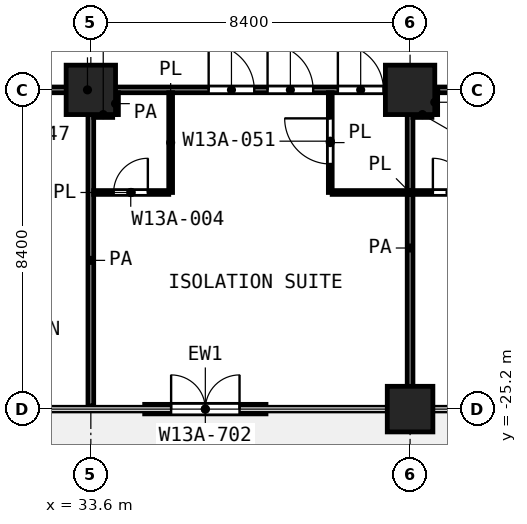
"""IFC4 building model, lengths in metres.
Left out: names, types, materials, properties, quantities, classifications, styles, units other than length and angle.
Written with IfcOpenShell. Run it as: python <this file> out.ifc"""

import sys

from ifc_helpers import new_model, si_unit, direction, frame, frame_2d, origin, origin_2d, place, context, subcontext, project, spatial, rectangle, extrude, element, fill, save


model = new_model("IFC4")
c1 = context("Model", 3, precision=1e-05, world=origin(), true_north=direction((0.0, 1.0)))
c2 = subcontext(c1, "Body", "Model", "MODEL_VIEW")
j1 = project(units=[si_unit("LENGTHUNIT", "METRE"), si_unit("PLANEANGLEUNIT", "RADIAN")], contexts=[c1])
p1 = place(None, origin())
s1 = spatial("IfcSite", under=j1, at=p1, CompositionType="ELEMENT")
p2 = place(p1, origin())
s2 = spatial("IfcBuilding", under=s1, at=p2, CompositionType="ELEMENT")
p3 = place(p2, frame((0.0, 0.0, 60.2)))
s3 = spatial("IfcBuildingStorey", under=s2, at=p3, CompositionType="ELEMENT", Elevation=60.2)
for number, where, z_axis, x_axis in (
    (1, (33.6, -16.8, 0.0), (0.0, 0.0, 1.0), (1.0, 0.0, 0.0)),
    (2, (42.0, -16.8, 0.0), (0.0, 0.0, 1.0), (1.0, 0.0, 0.0)),
):
    element("IfcColumn", number, at=place(p3, frame(where, z_axis=z_axis, x_axis=x_axis)), inside=s3, PredefinedType="COLUMN", context=c2, shape_type="SweptSolid", body=[
        extrude(rectangle(XDim=1.3, YDim=1.3, at=origin_2d()), origin(), (0.0, 0.0, 1.0), 4.2),
    ])
p4 = place(p3, frame((42.0, -25.2, 0.0), z_axis=(0.0, 0.0, 1.0), x_axis=(1.0, 0.0, 0.0)))
e3 = element("IfcColumn", 3, at=p4, inside=s3, PredefinedType="COLUMN", context=c2, shape_type="SweptSolid", body=[
    extrude(rectangle(XDim=1.2, YDim=1.2, at=origin_2d()), origin(), (0.0, 0.0, 1.0), 4.2),
])
p5 = place(p3, frame((35.017, -25.2, 0.0), z_axis=(0.0, 0.0, 1.0), x_axis=(1.0, 0.0, 0.0)))
e4 = element("IfcWall", 4, at=p5, inside=s3, PredefinedType="SOLIDWALL", context=c2, shape_type="SweptSolid", body=[
    extrude(rectangle(XDim=3.192, YDim=0.25, at=frame_2d((1.596, 0.0))), origin(), (0.0, 0.0, 1.0), 3.78),
])
p6 = place(p5, frame((0.696, 0.0, 0.0)))
e5 = element("IfcOpeningElement", 5, at=p6, cuts=e4, PredefinedType="OPENING", context=c2, shape_type="SweptSolid", body=[
    extrude(rectangle(XDim=1.8, YDim=2.1, at=frame_2d((0.9, 1.05))), frame((0.0, 0.135, 0.0), z_axis=(0.0, -1.0, 0.0), x_axis=(1.0, 0.0, 0.0)), (0.0, 0.0, 1.0), 0.27),
])
p7 = place(p3, frame((33.675, -19.5, 0.0), z_axis=(0.0, 0.0, 1.0), x_axis=(1.0, 0.0, 0.0)))
e6 = element("IfcWall", 6, at=p7, inside=s3, PredefinedType="PARTITIONING", context=c2, shape_type="SweptSolid", body=[
    extrude(rectangle(XDim=1.975, YDim=0.1, at=frame_2d((0.987, 0.0))), origin(), (0.0, 0.0, 1.0), 3.9),
])
p8 = place(p7, frame((0.525, 0.0, 0.0)))
e7 = element("IfcOpeningElement", 7, at=p8, cuts=e6, PredefinedType="OPENING", context=c2, shape_type="SweptSolid", body=[
    extrude(rectangle(XDim=0.9, YDim=2.1, at=frame_2d((0.45, 1.05))), frame((0.0, 0.06, 0.0), z_axis=(0.0, -1.0, 0.0), x_axis=(1.0, 0.0, 0.0)), (0.0, 0.0, 1.0), 0.12),
])
p9 = place(p3, frame((39.95, -19.5, 0.0), z_axis=(0.0, 0.0, 1.0), x_axis=(1.0, 0.0, 0.0)))
e8 = element("IfcWall", 8, at=p9, inside=s3, PredefinedType="PARTITIONING", context=c2, shape_type="SweptSolid", body=[
    extrude(rectangle(XDim=4.1, YDim=0.1, at=frame_2d((2.05, 0.0))), origin(), (0.0, 0.0, 1.0), 3.9),
])
p10 = place(p9, frame((2.65, 0.0, 0.0)))
e9 = element("IfcOpeningElement", 9, at=p10, cuts=e8, PredefinedType="OPENING", context=c2, shape_type="SweptSolid", body=[
    extrude(rectangle(XDim=0.9, YDim=2.1, at=frame_2d((0.45, 1.05))), frame((0.0, 0.06, 0.0), z_axis=(0.0, -1.0, 0.0), x_axis=(1.0, 0.0, 0.0)), (0.0, 0.0, 1.0), 0.12),
])
p11 = place(p3, frame((35.7, -19.5, 0.0), z_axis=(0.0, 0.0, 1.0), x_axis=(0.0, 1.0, 0.0)))
e10 = element("IfcWall", 10, at=p11, inside=s3, PredefinedType="PARTITIONING", context=c2, shape_type="SweptSolid", body=[
    extrude(rectangle(XDim=2.625, YDim=0.1, at=frame_2d((1.312, 0.0))), origin(), (0.0, 0.0, 1.0), 3.9),
])
p12 = place(p3, frame((39.9, -19.5, 0.0), z_axis=(0.0, 0.0, 1.0), x_axis=(0.0, 1.0, 0.0)))
e11 = element("IfcWall", 11, at=p12, inside=s3, PredefinedType="PARTITIONING", context=c2, shape_type="SweptSolid", body=[
    extrude(rectangle(XDim=2.625, YDim=0.1, at=frame_2d((1.312, 0.0))), origin(), (0.0, 0.0, 1.0), 3.9),
])
p13 = place(p12, frame((0.75, 0.0, 0.0)))
e12 = element("IfcOpeningElement", 12, at=p13, cuts=e11, PredefinedType="OPENING", context=c2, shape_type="SweptSolid", body=[
    extrude(rectangle(XDim=1.2, YDim=2.1, at=frame_2d((0.6, 1.05))), frame((0.0, 0.06, 0.0), z_axis=(0.0, -1.0, 0.0), x_axis=(1.0, 0.0, 0.0)), (0.0, 0.0, 1.0), 0.12),
])
p14 = place(p3, frame((33.677, -17.45, 0.0), z_axis=(0.0, 0.0, 1.0), x_axis=(1.0, 0.0, 0.0)))
e13 = element("IfcWall", 13, at=p14, inside=s3, PredefinedType="PARTITIONING", context=c2, shape_type="SweptSolid", body=[
    extrude(rectangle(XDim=0.498, YDim=0.15, at=frame_2d((0.249, 0.0))), origin(), (0.0, 0.0, 1.0), 3.9),
])
p15 = place(p3, frame((42.075, -17.45, 0.0), z_axis=(0.0, 0.0, 1.0), x_axis=(1.0, 0.0, 0.0)))
e14 = element("IfcWall", 14, at=p15, inside=s3, PredefinedType="PARTITIONING", context=c2, shape_type="SweptSolid", body=[
    extrude(rectangle(XDim=0.5, YDim=0.15, at=frame_2d((0.25, 0.0))), origin(), (0.0, 0.0, 1.0), 3.9),
])
p16 = place(p3, frame((25.1, -16.8, 0.0), z_axis=(0.0, 0.0, 1.0), x_axis=(1.0, 0.0, 0.0)))
e15 = element("IfcWall", 15, at=p16, inside=s3, PredefinedType="PARTITIONING", context=c2, shape_type="SweptSolid", body=[
    extrude(rectangle(XDim=16.823, YDim=0.15, at=frame_2d((8.412, 0.0))), origin(), (0.0, 0.0, 1.0), 3.9),
])
p17 = place(p16, frame((1.7, 0.0, 0.0)))
e16 = element("IfcOpeningElement", 16, at=p17, cuts=e15, PredefinedType="OPENING", context=c2, shape_type="SweptSolid", body=[
    extrude(rectangle(XDim=1.0, YDim=2.1, at=frame_2d((0.5, 1.05))), frame((0.0, 0.085, 0.0), z_axis=(0.0, -1.0, 0.0), x_axis=(1.0, 0.0, 0.0)), (0.0, 0.0, 1.0), 0.17),
])
p18 = place(p16, frame((6.125, 0.0, 0.0)))
e17 = element("IfcOpeningElement", 17, at=p18, cuts=e15, PredefinedType="OPENING", context=c2, shape_type="SweptSolid", body=[
    extrude(rectangle(XDim=1.2, YDim=2.1, at=frame_2d((0.6, 1.05))), frame((0.0, 0.085, 0.0), z_axis=(0.0, -1.0, 0.0), x_axis=(1.0, 0.0, 0.0)), (0.0, 0.0, 1.0), 0.17),
])
p19 = place(p16, frame((13.15, 0.0, 0.0)))
e18 = element("IfcOpeningElement", 18, at=p19, cuts=e15, PredefinedType="OPENING", context=c2, shape_type="SweptSolid", body=[
    extrude(rectangle(XDim=1.2, YDim=2.1, at=frame_2d((0.6, 1.05))), frame((0.0, 0.085, 0.0), z_axis=(0.0, -1.0, 0.0), x_axis=(1.0, 0.0, 0.0)), (0.0, 0.0, 1.0), 0.17),
])
p20 = place(p16, frame((11.6, 0.0, 0.0)))
e19 = element("IfcOpeningElement", 19, at=p20, cuts=e15, PredefinedType="OPENING", context=c2, shape_type="SweptSolid", body=[
    extrude(rectangle(XDim=1.2, YDim=2.1, at=frame_2d((0.6, 1.05))), frame((0.0, 0.085, 0.0), z_axis=(0.0, -1.0, 0.0), x_axis=(1.0, 0.0, 0.0)), (0.0, 0.0, 1.0), 0.17),
])
p21 = place(p16, frame((15.0, 0.0, 0.0)))
e20 = element("IfcOpeningElement", 20, at=p21, cuts=e15, PredefinedType="OPENING", context=c2, shape_type="SweptSolid", body=[
    extrude(rectangle(XDim=1.2, YDim=2.1, at=frame_2d((0.6, 1.05))), frame((0.0, 0.085, 0.0), z_axis=(0.0, -1.0, 0.0), x_axis=(1.0, 0.0, 0.0)), (0.0, 0.0, 1.0), 0.17),
])
p22 = place(p3, frame((42.727, -16.8, 0.0), z_axis=(0.0, 0.0, 1.0), x_axis=(1.0, 0.0, 0.0)))
e21 = element("IfcWall", 21, at=p22, inside=s3, PredefinedType="PARTITIONING", context=c2, shape_type="SweptSolid", body=[
    extrude(rectangle(XDim=7.595, YDim=0.15, at=frame_2d((3.797, 0.0))), origin(), (0.0, 0.0, 1.0), 3.9),
])
p23 = place(p22, frame((3.923, 0.0, 0.0)))
e22 = element("IfcOpeningElement", 22, at=p23, cuts=e21, PredefinedType="OPENING", context=c2, shape_type="SweptSolid", body=[
    extrude(rectangle(XDim=1.2, YDim=2.1, at=frame_2d((0.6, 1.05))), frame((0.0, 0.085, 0.0), z_axis=(0.0, -1.0, 0.0), x_axis=(1.0, 0.0, 0.0)), (0.0, 0.0, 1.0), 0.17),
])
p24 = place(p22, frame((2.373, 0.0, 0.0)))
e23 = element("IfcOpeningElement", 23, at=p24, cuts=e21, PredefinedType="OPENING", context=c2, shape_type="SweptSolid", body=[
    extrude(rectangle(XDim=1.2, YDim=2.1, at=frame_2d((0.6, 1.05))), frame((0.0, 0.085, 0.0), z_axis=(0.0, -1.0, 0.0), x_axis=(1.0, 0.0, 0.0)), (0.0, 0.0, 1.0), 0.17),
])
p25 = place(p22, frame((5.773, 0.0, 0.0)))
e24 = element("IfcOpeningElement", 24, at=p25, cuts=e21, PredefinedType="OPENING", context=c2, shape_type="SweptSolid", body=[
    extrude(rectangle(XDim=1.2, YDim=2.1, at=frame_2d((0.6, 1.05))), frame((0.0, 0.085, 0.0), z_axis=(0.0, -1.0, 0.0), x_axis=(1.0, 0.0, 0.0)), (0.0, 0.0, 1.0), 0.17),
])
p26 = place(p3, frame((33.6, -25.12, 0.0), z_axis=(0.0, 0.0, 1.0), x_axis=(0.0, 1.0, 0.0)))
e25 = element("IfcWall", 25, at=p26, inside=s3, PredefinedType="PARTITIONING", context=c2, shape_type="SweptSolid", body=[
    extrude(rectangle(XDim=7.668, YDim=0.15, at=frame_2d((3.834, 0.0))), origin(), (0.0, 0.0, 1.0), 3.9),
])
p27 = place(p3, frame((34.25, -17.45, 0.0), z_axis=(0.0, 0.0, 1.0), x_axis=(0.0, 1.0, 0.0)))
e26 = element("IfcWall", 26, at=p27, inside=s3, PredefinedType="PARTITIONING", context=c2, shape_type="SweptSolid", body=[
    extrude(rectangle(XDim=0.575, YDim=0.15, at=frame_2d((0.288, 0.0))), origin(), (0.0, 0.0, 1.0), 3.9),
])
p28 = place(p3, frame((42.0, -25.12, 0.0), z_axis=(0.0, 0.0, 1.0), x_axis=(0.0, 1.0, 0.0)))
e27 = element("IfcWall", 27, at=p28, inside=s3, PredefinedType="PARTITIONING", context=c2, shape_type="SweptSolid", body=[
    extrude(rectangle(XDim=8.318, YDim=0.15, at=frame_2d((4.159, 0.0))), origin(), (0.0, 0.0, 1.0), 3.9),
])
p29 = place(p3, frame((42.65, -17.45, 0.0), z_axis=(0.0, 0.0, 1.0), x_axis=(0.0, 1.0, 0.0)))
e28 = element("IfcWall", 28, at=p29, inside=s3, PredefinedType="PARTITIONING", context=c2, shape_type="SweptSolid", body=[
    extrude(rectangle(XDim=0.648, YDim=0.15, at=frame_2d((0.324, 0.0))), origin(), (0.0, 0.0, 1.0), 3.9),
])
p30 = place(p6, origin())
e29 = element("IfcDoor", 29, at=p30, inside=s3, OperationType="DOUBLE_DOOR_SINGLE_SWING", PredefinedType="DOOR", context=c2, shape_type="SweptSolid", body=[
    extrude(rectangle(XDim=1.8, YDim=2.1, at=frame_2d((0.9, 1.05))), frame((0.0, 0.025, 0.0), z_axis=(0.0, -1.0, 0.0), x_axis=(1.0, 0.0, 0.0)), (0.0, 0.0, 1.0), 0.05),
])
fill(e5, e29)
p31 = place(p19, origin())
e30 = element("IfcDoor", 30, at=p31, inside=s3, OperationType="SINGLE_SWING_LEFT", PredefinedType="DOOR", context=c2, shape_type="SweptSolid", body=[
    extrude(rectangle(XDim=1.2, YDim=2.1, at=frame_2d((0.6, 1.05))), frame((0.0, 0.025, 0.0), z_axis=(0.0, -1.0, 0.0), x_axis=(1.0, 0.0, 0.0)), (0.0, 0.0, 1.0), 0.05),
])
fill(e18, e30)
p32 = place(p20, origin())
e31 = element("IfcDoor", 31, at=p32, inside=s3, OperationType="SINGLE_SWING_LEFT", PredefinedType="DOOR", context=c2, shape_type="SweptSolid", body=[
    extrude(rectangle(XDim=1.2, YDim=2.1, at=frame_2d((0.6, 1.05))), frame((0.0, 0.025, 0.0), z_axis=(0.0, -1.0, 0.0), x_axis=(1.0, 0.0, 0.0)), (0.0, 0.0, 1.0), 0.05),
])
fill(e19, e31)
p33 = place(p21, origin())
e32 = element("IfcDoor", 32, at=p33, inside=s3, OperationType="SINGLE_SWING_LEFT", PredefinedType="DOOR", context=c2, shape_type="SweptSolid", body=[
    extrude(rectangle(XDim=1.2, YDim=2.1, at=frame_2d((0.6, 1.05))), frame((0.0, 0.025, 0.0), z_axis=(0.0, -1.0, 0.0), x_axis=(1.0, 0.0, 0.0)), (0.0, 0.0, 1.0), 0.05),
])
fill(e20, e32)
p34 = place(p13, origin())
e33 = element("IfcDoor", 33, at=p34, inside=s3, OperationType="SINGLE_SWING_RIGHT", PredefinedType="DOOR", context=c2, shape_type="SweptSolid", body=[
    extrude(rectangle(XDim=1.2, YDim=2.1, at=frame_2d((0.6, 1.05))), frame((0.0, 0.025, 0.0), z_axis=(0.0, -1.0, 0.0), x_axis=(1.0, 0.0, 0.0)), (0.0, 0.0, 1.0), 0.05),
])
fill(e12, e33)
p35 = place(p8, origin())
e34 = element("IfcDoor", 34, at=p35, inside=s3, OperationType="SINGLE_SWING_RIGHT", PredefinedType="DOOR", context=c2, shape_type="SweptSolid", body=[
    extrude(rectangle(XDim=0.9, YDim=2.1, at=frame_2d((0.45, 1.05))), frame((0.0, 0.025, 0.0), z_axis=(0.0, -1.0, 0.0), x_axis=(1.0, 0.0, 0.0)), (0.0, 0.0, 1.0), 0.05),
])
fill(e7, e34)
p36 = place(p10, origin())
e35 = element("IfcDoor", 35, at=p36, inside=s3, OperationType="SINGLE_SWING_LEFT", PredefinedType="DOOR", context=c2, shape_type="SweptSolid", body=[
    extrude(rectangle(XDim=0.9, YDim=2.1, at=frame_2d((0.45, 1.05))), frame((0.0, 0.025, 0.0), z_axis=(0.0, -1.0, 0.0), x_axis=(1.0, 0.0, 0.0)), (0.0, 0.0, 1.0), 0.05),
])
fill(e9, e35)
save(model, sys.argv[1])
